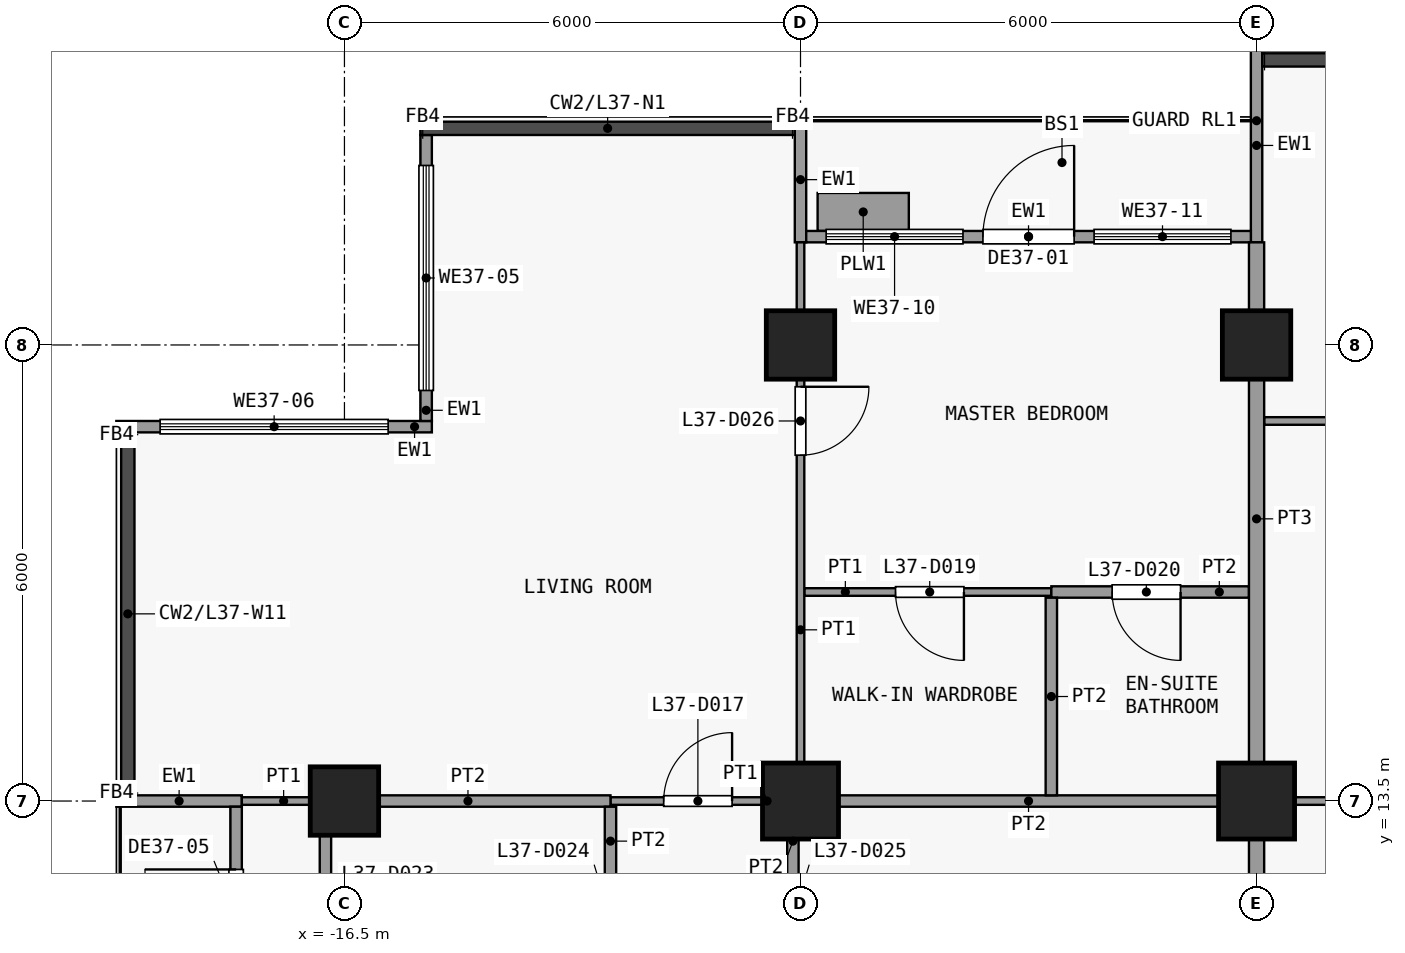
"""IFC4 building model, lengths in metres.
Left out: names, types, materials, properties, quantities, classifications, styles, units other than length and angle.
Written with IfcOpenShell. Run it as: python <this file> out.ifc"""

import sys

from ifc_helpers import new_model, si_unit, direction, frame, frame_2d, origin, origin_2d, place, context, subcontext, project, spatial, rectangle, extrude, element, fill, save


model = new_model("IFC4")
c1 = context("Model", 3, precision=1e-05, world=origin(), true_north=direction((0.0, 1.0)))
c2 = subcontext(c1, "Body", "Model", "MODEL_VIEW")
j1 = project(units=[si_unit("LENGTHUNIT", "METRE"), si_unit("PLANEANGLEUNIT", "RADIAN")], contexts=[c1])
p1 = place(None, origin())
s1 = spatial("IfcSite", under=j1, at=p1, CompositionType="ELEMENT")
p2 = place(p1, origin())
s2 = spatial("IfcBuilding", under=s1, at=p2, CompositionType="ELEMENT")
p3 = place(p2, frame((0.0, 0.0, 152.9)))
s3 = spatial("IfcBuildingStorey", under=s2, at=p3, CompositionType="ELEMENT", Elevation=152.9)
p4 = place(p3, frame((-16.5, 13.5, 0.0), z_axis=(0.0, 0.0, 1.0), x_axis=(1.0, 0.0, 0.0)))
e1 = element("IfcColumn", 1, at=p4, inside=s3, PredefinedType="COLUMN", context=c2, shape_type="SweptSolid", body=[
    extrude(rectangle(XDim=0.9, YDim=0.9, at=origin_2d()), origin(), (0.0, 0.0, 1.0), 3.6),
])
p5 = place(p3, frame((-10.5, 13.5, 0.0), z_axis=(0.0, 0.0, 1.0), x_axis=(1.0, 0.0, 0.0)))
e2 = element("IfcColumn", 2, at=p5, inside=s3, PredefinedType="COLUMN", context=c2, shape_type="SweptSolid", body=[
    extrude(rectangle(XDim=1.0, YDim=1.0, at=origin_2d()), origin(), (0.0, 0.0, 1.0), 3.6),
])
p6 = place(p3, frame((-10.5, 19.5, 0.0), z_axis=(0.0, 0.0, 1.0), x_axis=(1.0, 0.0, 0.0)))
e3 = element("IfcColumn", 3, at=p6, inside=s3, PredefinedType="COLUMN", context=c2, shape_type="SweptSolid", body=[
    extrude(rectangle(XDim=0.9, YDim=0.9, at=origin_2d()), origin(), (0.0, 0.0, 1.0), 3.6),
])
p7 = place(p3, frame((-4.5, 13.5, 0.0), z_axis=(0.0, 0.0, 1.0), x_axis=(1.0, 0.0, 0.0)))
e4 = element("IfcColumn", 4, at=p7, inside=s3, PredefinedType="COLUMN", context=c2, shape_type="SweptSolid", body=[
    extrude(rectangle(XDim=1.0, YDim=1.0, at=origin_2d()), origin(), (0.0, 0.0, 1.0), 3.6),
])
p8 = place(p3, frame((-4.5, 19.5, 0.0), z_axis=(0.0, 0.0, 1.0), x_axis=(1.0, 0.0, 0.0)))
e5 = element("IfcColumn", 5, at=p8, inside=s3, PredefinedType="COLUMN", context=c2, shape_type="SweptSolid", body=[
    extrude(rectangle(XDim=0.9, YDim=0.9, at=origin_2d()), origin(), (0.0, 0.0, 1.0), 3.6),
])
p9 = place(p3, frame((-15.425, 18.5, 0.0), z_axis=(0.0, 0.0, 1.0), x_axis=(0.0, 1.0, 0.0)))
e6 = element("IfcWall", 6, at=p9, inside=s3, PredefinedType="SOLIDWALL", context=c2, shape_type="SweptSolid", body=[
    extrude(rectangle(XDim=3.762, YDim=0.15, at=frame_2d((1.881, 0.0))), origin(), (0.0, 0.0, 1.0), 3.3),
])
p10 = place(p9, frame((0.401, 0.0, 0.9)))
e7 = element("IfcOpeningElement", 7, at=p10, cuts=e6, PredefinedType="OPENING", context=c2, shape_type="SweptSolid", body=[
    extrude(rectangle(XDim=2.96, YDim=2.4, at=frame_2d((1.48, 1.2))), frame((0.0, 0.085, 0.0), z_axis=(0.0, -1.0, 0.0), x_axis=(1.0, 0.0, 0.0)), (0.0, 0.0, 1.0), 0.17),
])
p11 = place(p3, frame((-19.5, 18.425, 0.0), z_axis=(0.0, 0.0, 1.0), x_axis=(1.0, 0.0, 0.0)))
e8 = element("IfcWall", 8, at=p11, inside=s3, PredefinedType="SOLIDWALL", context=c2, shape_type="SweptSolid", body=[
    extrude(rectangle(XDim=4.15, YDim=0.15, at=frame_2d((2.075, 0.0))), origin(), (0.0, 0.0, 1.0), 3.3),
])
p12 = place(p11, frame((0.575, 0.0, 0.9)))
e9 = element("IfcOpeningElement", 9, at=p12, cuts=e8, PredefinedType="OPENING", context=c2, shape_type="SweptSolid", body=[
    extrude(rectangle(XDim=3.0, YDim=2.4, at=frame_2d((1.5, 1.2))), frame((0.0, 0.085, 0.0), z_axis=(0.0, -1.0, 0.0), x_axis=(1.0, 0.0, 0.0)), (0.0, 0.0, 1.0), 0.17),
])
p13 = place(p3, frame((-10.5, 20.85, 0.0), z_axis=(0.0, 0.0, 1.0), x_axis=(0.0, 1.0, 0.0)))
e10 = element("IfcWall", 10, at=p13, inside=s3, PredefinedType="SOLIDWALL", context=c2, shape_type="SweptSolid", body=[
    extrude(rectangle(XDim=1.65, YDim=0.15, at=frame_2d((0.825, 0.0))), origin(), (0.0, 0.0, 1.0), 3.3),
])
p14 = place(p3, frame((-4.5, 20.85, 0.0), z_axis=(0.0, 0.0, 1.0), x_axis=(0.0, 1.0, 0.0)))
e11 = element("IfcWall", 11, at=p14, inside=s3, PredefinedType="SOLIDWALL", context=c2, shape_type="SweptSolid", body=[
    extrude(rectangle(XDim=2.55, YDim=0.15, at=frame_2d((1.275, 0.0))), origin(), (0.0, 0.0, 1.0), 3.3),
])
p15 = place(p3, frame((-10.425, 20.925, 0.0), z_axis=(0.0, 0.0, 1.0), x_axis=(1.0, 0.0, 0.0)))
e12 = element("IfcWall", 12, at=p15, inside=s3, PredefinedType="SOLIDWALL", context=c2, shape_type="SweptSolid", body=[
    extrude(rectangle(XDim=5.85, YDim=0.15, at=frame_2d((2.925, 0.0))), origin(), (0.0, 0.0, 1.0), 3.3),
])
p16 = place(p15, frame((2.325, 0.0, 0.0)))
e13 = element("IfcOpeningElement", 13, at=p16, cuts=e12, PredefinedType="OPENING", context=c2, shape_type="SweptSolid", body=[
    extrude(rectangle(XDim=1.2, YDim=2.4, at=frame_2d((0.6, 1.2))), frame((0.0, 0.085, 0.0), z_axis=(0.0, -1.0, 0.0), x_axis=(1.0, 0.0, 0.0)), (0.0, 0.0, 1.0), 0.17),
])
p17 = place(p15, frame((0.262, 0.0, 0.9)))
e14 = element("IfcOpeningElement", 14, at=p17, cuts=e12, PredefinedType="OPENING", context=c2, shape_type="SweptSolid", body=[
    extrude(rectangle(XDim=1.8, YDim=2.1, at=frame_2d((0.9, 1.05))), frame((0.0, 0.085, 0.0), z_axis=(0.0, -1.0, 0.0), x_axis=(1.0, 0.0, 0.0)), (0.0, 0.0, 1.0), 0.17),
])
p18 = place(p15, frame((3.788, 0.0, 0.9)))
e15 = element("IfcOpeningElement", 15, at=p18, cuts=e12, PredefinedType="OPENING", context=c2, shape_type="SweptSolid", body=[
    extrude(rectangle(XDim=1.8, YDim=2.1, at=frame_2d((0.9, 1.05))), frame((0.0, 0.085, 0.0), z_axis=(0.0, -1.0, 0.0), x_axis=(1.0, 0.0, 0.0)), (0.0, 0.0, 1.0), 0.17),
])
p19 = place(p3, frame((-10.275, 21.25, 0.0), z_axis=(0.0, 0.0, 1.0), x_axis=(1.0, 0.0, 0.0)))
e16 = element("IfcWall", 16, at=p19, inside=s3, PredefinedType="USERDEFINED", context=c2, shape_type="SweptSolid", body=[
    extrude(rectangle(XDim=1.2, YDim=0.5, at=frame_2d((0.6, 0.0))), origin(), (0.0, 0.0, 1.0), 0.9),
])
p20 = place(p3, frame((-17.85, 13.5, 0.0), z_axis=(0.0, 0.0, 1.0), x_axis=(-1.0, 0.0, 0.0)))
e17 = element("IfcWall", 17, at=p20, inside=s3, PredefinedType="SOLIDWALL", context=c2, shape_type="SweptSolid", body=[
    extrude(rectangle(XDim=1.65, YDim=0.15, at=frame_2d((0.825, 0.0))), origin(), (0.0, 0.0, 1.0), 3.3),
])
p21 = place(p3, frame((-17.925, 7.575, 0.0), z_axis=(0.0, 0.0, 1.0), x_axis=(0.0, 1.0, 0.0)))
e18 = element("IfcWall", 18, at=p21, inside=s3, PredefinedType="SOLIDWALL", context=c2, shape_type="SweptSolid", body=[
    extrude(rectangle(XDim=5.85, YDim=0.15, at=frame_2d((2.925, 0.0))), origin(), (0.0, 0.0, 1.0), 3.3),
])
p22 = place(p21, frame((3.825, 0.0, 0.0)))
e19 = element("IfcOpeningElement", 19, at=p22, cuts=e18, PredefinedType="OPENING", context=c2, shape_type="SweptSolid", body=[
    extrude(rectangle(XDim=1.2, YDim=2.4, at=frame_2d((0.6, 1.2))), frame((0.0, 0.085, 0.0), z_axis=(0.0, -1.0, 0.0), x_axis=(1.0, 0.0, 0.0)), (0.0, 0.0, 1.0), 0.17),
])
p23 = place(p21, frame((1.012, 0.0, 0.9)))
e20 = element("IfcOpeningElement", 20, at=p23, cuts=e18, PredefinedType="OPENING", context=c2, shape_type="SweptSolid", body=[
    extrude(rectangle(XDim=1.8, YDim=2.1, at=frame_2d((0.9, 1.05))), frame((0.0, 0.085, 0.0), z_axis=(0.0, -1.0, 0.0), x_axis=(1.0, 0.0, 0.0)), (0.0, 0.0, 1.0), 0.17),
])
p24 = place(p3, frame((-17.85, 13.5, 0.0), z_axis=(0.0, 0.0, 1.0), x_axis=(1.0, 0.0, 0.0)))
e21 = element("IfcWall", 21, at=p24, inside=s3, PredefinedType="PARTITIONING", context=c2, shape_type="SweptSolid", body=[
    extrude(rectangle(XDim=1.1, YDim=0.1, at=frame_2d((0.55, 0.0))), origin(), (0.0, 0.0, 1.0), 3.3),
])
p25 = place(p3, frame((-13.0, 13.5, 0.0), z_axis=(0.0, 0.0, 1.0), x_axis=(1.0, 0.0, 0.0)))
e22 = element("IfcWall", 22, at=p25, inside=s3, PredefinedType="PARTITIONING", context=c2, shape_type="SweptSolid", body=[
    extrude(rectangle(XDim=2.4, YDim=0.1, at=frame_2d((1.2, 0.0))), origin(), (0.0, 0.0, 1.0), 3.3),
])
p26 = place(p25, frame((0.7, 0.0, 0.0)))
e23 = element("IfcOpeningElement", 23, at=p26, cuts=e22, PredefinedType="OPENING", context=c2, shape_type="SweptSolid", body=[
    extrude(rectangle(XDim=0.9, YDim=2.1, at=frame_2d((0.45, 1.05))), frame((0.0, 0.06, 0.0), z_axis=(0.0, -1.0, 0.0), x_axis=(1.0, 0.0, 0.0)), (0.0, 0.0, 1.0), 0.12),
])
p27 = place(p3, frame((-4.5, 13.5, 0.0), z_axis=(0.0, 0.0, 1.0), x_axis=(1.0, 0.0, 0.0)))
e24 = element("IfcWall", 24, at=p27, inside=s3, PredefinedType="PARTITIONING", context=c2, shape_type="SweptSolid", body=[
    extrude(rectangle(XDim=4.5, YDim=0.1, at=frame_2d((2.25, 0.0))), origin(), (0.0, 0.0, 1.0), 3.3),
])
p28 = place(p3, frame((-16.75, 13.5, 0.0), z_axis=(0.0, 0.0, 1.0), x_axis=(1.0, 0.0, 0.0)))
e25 = element("IfcWall", 25, at=p28, inside=s3, PredefinedType="PARTITIONING", context=c2, shape_type="SweptSolid", body=[
    extrude(rectangle(XDim=3.75, YDim=0.15, at=frame_2d((1.875, 0.0))), origin(), (0.0, 0.0, 1.0), 3.3),
])
p29 = place(p3, frame((-10.5, 13.5, 0.0), z_axis=(0.0, 0.0, 1.0), x_axis=(1.0, 0.0, 0.0)))
e26 = element("IfcWall", 26, at=p29, inside=s3, PredefinedType="PARTITIONING", context=c2, shape_type="SweptSolid", body=[
    extrude(rectangle(XDim=6.0, YDim=0.15, at=frame_2d((3.0, 0.0))), origin(), (0.0, 0.0, 1.0), 3.3),
])
p30 = place(p3, frame((-10.45, 16.25, 0.0), z_axis=(0.0, 0.0, 1.0), x_axis=(1.0, 0.0, 0.0)))
e27 = element("IfcWall", 27, at=p30, inside=s3, PredefinedType="PARTITIONING", context=c2, shape_type="SweptSolid", body=[
    extrude(rectangle(XDim=3.25, YDim=0.1, at=frame_2d((1.625, 0.0))), origin(), (0.0, 0.0, 1.0), 3.3),
])
p31 = place(p30, frame((1.2, 0.0, 0.0)))
e28 = element("IfcOpeningElement", 28, at=p31, cuts=e27, PredefinedType="OPENING", context=c2, shape_type="SweptSolid", body=[
    extrude(rectangle(XDim=0.9, YDim=2.1, at=frame_2d((0.45, 1.05))), frame((0.0, 0.06, 0.0), z_axis=(0.0, -1.0, 0.0), x_axis=(1.0, 0.0, 0.0)), (0.0, 0.0, 1.0), 0.12),
])
p32 = place(p3, frame((-7.2, 16.25, 0.0), z_axis=(0.0, 0.0, 1.0), x_axis=(1.0, 0.0, 0.0)))
e29 = element("IfcWall", 29, at=p32, inside=s3, PredefinedType="PARTITIONING", context=c2, shape_type="SweptSolid", body=[
    extrude(rectangle(XDim=2.6, YDim=0.15, at=frame_2d((1.3, 0.0))), origin(), (0.0, 0.0, 1.0), 3.3),
])
p33 = place(p32, frame((0.8, 0.0, 0.0)))
e30 = element("IfcOpeningElement", 30, at=p33, cuts=e29, PredefinedType="OPENING", context=c2, shape_type="SweptSolid", body=[
    extrude(rectangle(XDim=0.9, YDim=2.1, at=frame_2d((0.45, 1.05))), frame((0.0, 0.085, 0.0), z_axis=(0.0, -1.0, 0.0), x_axis=(1.0, 0.0, 0.0)), (0.0, 0.0, 1.0), 0.17),
])
p34 = place(p3, frame((-4.4, 18.5, 0.0), z_axis=(0.0, 0.0, 1.0), x_axis=(1.0, 0.0, 0.0)))
e31 = element("IfcWall", 31, at=p34, inside=s3, PredefinedType="PARTITIONING", context=c2, shape_type="SweptSolid", body=[
    extrude(rectangle(XDim=8.85, YDim=0.1, at=frame_2d((4.425, 0.0))), origin(), (0.0, 0.0, 1.0), 3.3),
])
p35 = place(p34, frame((4.0, 0.0, 0.0)))
e32 = element("IfcOpeningElement", 32, at=p35, cuts=e31, PredefinedType="OPENING", context=c2, shape_type="SweptSolid", body=[
    extrude(rectangle(XDim=0.9, YDim=2.1, at=frame_2d((0.45, 1.05))), frame((0.0, 0.06, 0.0), z_axis=(0.0, -1.0, 0.0), x_axis=(1.0, 0.0, 0.0)), (0.0, 0.0, 1.0), 0.12),
])
p36 = place(p3, frame((-16.75, 10.6, 0.0), z_axis=(0.0, 0.0, 1.0), x_axis=(0.0, 1.0, 0.0)))
e33 = element("IfcWall", 33, at=p36, inside=s3, PredefinedType="PARTITIONING", context=c2, shape_type="SweptSolid", body=[
    extrude(rectangle(XDim=2.825, YDim=0.15, at=frame_2d((1.413, 0.0))), origin(), (0.0, 0.0, 1.0), 3.3),
])
p37 = place(p36, frame((1.0, 0.0, 0.0)))
e34 = element("IfcOpeningElement", 34, at=p37, cuts=e33, PredefinedType="OPENING", context=c2, shape_type="SweptSolid", body=[
    extrude(rectangle(XDim=0.9, YDim=2.1, at=frame_2d((0.45, 1.05))), frame((0.0, 0.085, 0.0), z_axis=(0.0, -1.0, 0.0), x_axis=(1.0, 0.0, 0.0)), (0.0, 0.0, 1.0), 0.17),
])
p38 = place(p3, frame((-13.0, 10.6, 0.0), z_axis=(0.0, 0.0, 1.0), x_axis=(0.0, 1.0, 0.0)))
e35 = element("IfcWall", 35, at=p38, inside=s3, PredefinedType="PARTITIONING", context=c2, shape_type="SweptSolid", body=[
    extrude(rectangle(XDim=2.825, YDim=0.15, at=frame_2d((1.413, 0.0))), origin(), (0.0, 0.0, 1.0), 3.3),
])
p39 = place(p38, frame((0.9, 0.0, 0.0)))
e36 = element("IfcOpeningElement", 36, at=p39, cuts=e35, PredefinedType="OPENING", context=c2, shape_type="SweptSolid", body=[
    extrude(rectangle(XDim=0.9, YDim=2.1, at=frame_2d((0.45, 1.05))), frame((0.0, 0.085, 0.0), z_axis=(0.0, -1.0, 0.0), x_axis=(1.0, 0.0, 0.0)), (0.0, 0.0, 1.0), 0.17),
])
p40 = place(p3, frame((-10.6, 10.6, 0.0), z_axis=(0.0, 0.0, 1.0), x_axis=(0.0, 1.0, 0.0)))
e37 = element("IfcWall", 37, at=p40, inside=s3, PredefinedType="PARTITIONING", context=c2, shape_type="SweptSolid", body=[
    extrude(rectangle(XDim=2.825, YDim=0.15, at=frame_2d((1.413, 0.0))), origin(), (0.0, 0.0, 1.0), 3.3),
])
p41 = place(p40, frame((0.9, 0.0, 0.0)))
e38 = element("IfcOpeningElement", 38, at=p41, cuts=e37, PredefinedType="OPENING", context=c2, shape_type="SweptSolid", body=[
    extrude(rectangle(XDim=0.9, YDim=2.1, at=frame_2d((0.45, 1.05))), frame((0.0, 0.085, 0.0), z_axis=(0.0, -1.0, 0.0), x_axis=(1.0, 0.0, 0.0)), (0.0, 0.0, 1.0), 0.17),
])
p42 = place(p3, frame((-10.5, 13.575, 0.0), z_axis=(0.0, 0.0, 1.0), x_axis=(0.0, 1.0, 0.0)))
e39 = element("IfcWall", 39, at=p42, inside=s3, PredefinedType="PARTITIONING", context=c2, shape_type="SweptSolid", body=[
    extrude(rectangle(XDim=7.275, YDim=0.1, at=frame_2d((3.638, 0.0))), origin(), (0.0, 0.0, 1.0), 3.3),
])
p43 = place(p42, frame((4.475, 0.0, 0.0)))
e40 = element("IfcOpeningElement", 40, at=p43, cuts=e39, PredefinedType="OPENING", context=c2, shape_type="SweptSolid", body=[
    extrude(rectangle(XDim=0.9, YDim=2.1, at=frame_2d((0.45, 1.05))), frame((0.0, 0.06, 0.0), z_axis=(0.0, -1.0, 0.0), x_axis=(1.0, 0.0, 0.0)), (0.0, 0.0, 1.0), 0.12),
])
p44 = place(p3, frame((-7.2, 13.575, 0.0), z_axis=(0.0, 0.0, 1.0), x_axis=(0.0, 1.0, 0.0)))
e41 = element("IfcWall", 41, at=p44, inside=s3, PredefinedType="PARTITIONING", context=c2, shape_type="SweptSolid", body=[
    extrude(rectangle(XDim=2.6, YDim=0.15, at=frame_2d((1.3, 0.0))), origin(), (0.0, 0.0, 1.0), 3.3),
])
p45 = place(p3, frame((-4.5, 10.6, 0.0), z_axis=(0.0, 0.0, 1.0), x_axis=(0.0, 1.0, 0.0)))
e42 = element("IfcWall", 42, at=p45, inside=s3, PredefinedType="PARTITIONING", context=c2, shape_type="SweptSolid", body=[
    extrude(rectangle(XDim=2.825, YDim=0.2, at=frame_2d((1.413, 0.0))), origin(), (0.0, 0.0, 1.0), 3.3),
])
p46 = place(p3, frame((-4.5, 13.575, 0.0), z_axis=(0.0, 0.0, 1.0), x_axis=(0.0, 1.0, 0.0)))
e43 = element("IfcWall", 43, at=p46, inside=s3, PredefinedType="PARTITIONING", context=c2, shape_type="SweptSolid", body=[
    extrude(rectangle(XDim=7.275, YDim=0.2, at=frame_2d((3.638, 0.0))), origin(), (0.0, 0.0, 1.0), 3.3),
])
p47 = place(p10, origin())
e44 = element("IfcWindow", 44, at=p47, inside=s3, PartitioningType="SINGLE_PANEL", PredefinedType="WINDOW", context=c2, shape_type="SweptSolid", body=[
    extrude(rectangle(XDim=2.96, YDim=2.4, at=frame_2d((1.48, 1.2))), frame((0.0, 0.03, 0.0), z_axis=(0.0, -1.0, 0.0), x_axis=(1.0, 0.0, 0.0)), (0.0, 0.0, 1.0), 0.06),
])
fill(e7, e44)
p48 = place(p12, origin())
e45 = element("IfcWindow", 45, at=p48, inside=s3, PartitioningType="SINGLE_PANEL", PredefinedType="WINDOW", context=c2, shape_type="SweptSolid", body=[
    extrude(rectangle(XDim=3.0, YDim=2.4, at=frame_2d((1.5, 1.2))), frame((0.0, 0.03, 0.0), z_axis=(0.0, -1.0, 0.0), x_axis=(1.0, 0.0, 0.0)), (0.0, 0.0, 1.0), 0.06),
])
fill(e9, e45)
p49 = place(p16, origin())
e46 = element("IfcDoor", 46, at=p49, inside=s3, OperationType="SINGLE_SWING_RIGHT", PredefinedType="DOOR", context=c2, shape_type="SweptSolid", body=[
    extrude(rectangle(XDim=1.2, YDim=2.4, at=frame_2d((0.6, 1.2))), frame((0.0, 0.025, 0.0), z_axis=(0.0, -1.0, 0.0), x_axis=(1.0, 0.0, 0.0)), (0.0, 0.0, 1.0), 0.05),
])
fill(e13, e46)
p50 = place(p17, origin())
e47 = element("IfcWindow", 47, at=p50, inside=s3, PartitioningType="SINGLE_PANEL", PredefinedType="WINDOW", context=c2, shape_type="SweptSolid", body=[
    extrude(rectangle(XDim=1.8, YDim=2.1, at=frame_2d((0.9, 1.05))), frame((0.0, 0.03, 0.0), z_axis=(0.0, -1.0, 0.0), x_axis=(1.0, 0.0, 0.0)), (0.0, 0.0, 1.0), 0.06),
])
fill(e14, e47)
p51 = place(p18, origin())
e48 = element("IfcWindow", 48, at=p51, inside=s3, PartitioningType="SINGLE_PANEL", PredefinedType="WINDOW", context=c2, shape_type="SweptSolid", body=[
    extrude(rectangle(XDim=1.8, YDim=2.1, at=frame_2d((0.9, 1.05))), frame((0.0, 0.03, 0.0), z_axis=(0.0, -1.0, 0.0), x_axis=(1.0, 0.0, 0.0)), (0.0, 0.0, 1.0), 0.06),
])
fill(e15, e48)
p52 = place(p22, origin())
e49 = element("IfcDoor", 49, at=p52, inside=s3, OperationType="SINGLE_SWING_RIGHT", PredefinedType="DOOR", context=c2, shape_type="SweptSolid", body=[
    extrude(rectangle(XDim=1.2, YDim=2.4, at=frame_2d((0.6, 1.2))), frame((0.0, 0.025, 0.0), z_axis=(0.0, -1.0, 0.0), x_axis=(1.0, 0.0, 0.0)), (0.0, 0.0, 1.0), 0.05),
])
fill(e19, e49)
p53 = place(p26, origin())
e50 = element("IfcDoor", 50, at=p53, inside=s3, OperationType="SINGLE_SWING_LEFT", PredefinedType="DOOR", context=c2, shape_type="SweptSolid", body=[
    extrude(rectangle(XDim=0.9, YDim=2.1, at=frame_2d((0.45, 1.05))), frame((0.0, 0.025, 0.0), z_axis=(0.0, -1.0, 0.0), x_axis=(1.0, 0.0, 0.0)), (0.0, 0.0, 1.0), 0.05),
])
fill(e23, e50)
p54 = place(p31, origin())
e51 = element("IfcDoor", 51, at=p54, inside=s3, OperationType="SINGLE_SWING_RIGHT", PredefinedType="DOOR", context=c2, shape_type="SweptSolid", body=[
    extrude(rectangle(XDim=0.9, YDim=2.1, at=frame_2d((0.45, 1.05))), frame((0.0, 0.025, 0.0), z_axis=(0.0, -1.0, 0.0), x_axis=(1.0, 0.0, 0.0)), (0.0, 0.0, 1.0), 0.05),
])
fill(e28, e51)
p55 = place(p33, origin())
e52 = element("IfcDoor", 52, at=p55, inside=s3, OperationType="SINGLE_SWING_RIGHT", PredefinedType="DOOR", context=c2, shape_type="SweptSolid", body=[
    extrude(rectangle(XDim=0.9, YDim=2.1, at=frame_2d((0.45, 1.05))), frame((0.0, 0.025, 0.0), z_axis=(0.0, -1.0, 0.0), x_axis=(1.0, 0.0, 0.0)), (0.0, 0.0, 1.0), 0.05),
])
fill(e30, e52)
p56 = place(p43, origin())
e53 = element("IfcDoor", 53, at=p56, inside=s3, OperationType="SINGLE_SWING_RIGHT", PredefinedType="DOOR", context=c2, shape_type="SweptSolid", body=[
    extrude(rectangle(XDim=0.9, YDim=2.1, at=frame_2d((0.45, 1.05))), frame((0.0, 0.025, 0.0), z_axis=(0.0, -1.0, 0.0), x_axis=(1.0, 0.0, 0.0)), (0.0, 0.0, 1.0), 0.05),
])
fill(e40, e53)
save(model, sys.argv[1])
